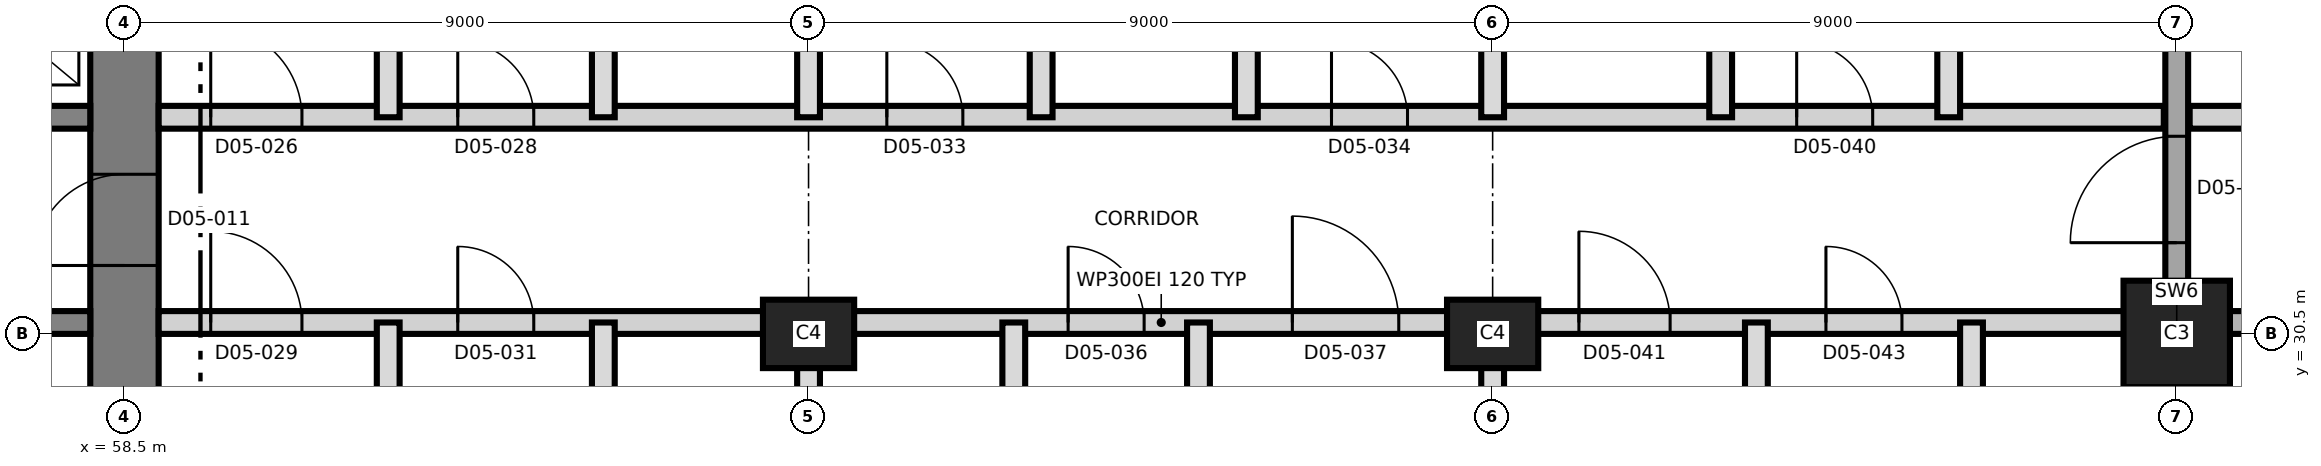
"""IFC4 building model, lengths in metres.
Left out: names, types, materials, properties, quantities, classifications, styles, units other than length and angle.
Written with IfcOpenShell. Run it as: python <this file> out.ifc"""

import sys

from ifc_helpers import new_model, si_unit, direction, frame, frame_2d, origin, origin_2d, place, context, subcontext, project, spatial, rectangle, extrude, element, fill, save


model = new_model("IFC4")
c1 = context("Model", 3, precision=1e-05, world=origin(), true_north=direction((0.0, 1.0)))
c2 = subcontext(c1, "Body", "Model", "MODEL_VIEW")
j1 = project(units=[si_unit("LENGTHUNIT", "METRE"), si_unit("PLANEANGLEUNIT", "RADIAN")], contexts=[c1])
p1 = place(None, origin())
s1 = spatial("IfcSite", under=j1, at=p1, CompositionType="ELEMENT")
p2 = place(p1, origin())
s2 = spatial("IfcBuilding", under=s1, at=p2, CompositionType="ELEMENT")
p3 = place(p2, frame((0.0, 0.0, 70.5)))
s3 = spatial("IfcBuildingStorey", under=s2, at=p3, CompositionType="ELEMENT", Elevation=70.5)
p4 = place(p3, frame((58.5, 21.05, 0.0), z_axis=(0.0, 0.0, 1.0), x_axis=(0.0, 1.0, 0.0)))
e1 = element("IfcWall", 1, at=p4, inside=s3, PredefinedType="SHEAR", context=c2, shape_type="SweptSolid", body=[
    extrude(rectangle(XDim=18.9, YDim=0.9, at=frame_2d((9.45, 0.0))), origin(), (0.0, 0.0, 1.0), 3.7),
])
p5 = place(p4, frame((10.35, 0.0, 0.0)))
e2 = element("IfcOpeningElement", 2, at=p5, cuts=e1, PredefinedType="OPENING", context=c2, shape_type="SweptSolid", body=[
    extrude(rectangle(XDim=1.2, YDim=2.1, at=frame_2d((0.6, 1.05))), frame((0.0, 0.46, 0.0), z_axis=(0.0, -1.0, 0.0), x_axis=(1.0, 0.0, 0.0)), (0.0, 0.0, 1.0), 0.92),
])
p6 = place(p3, frame((31.95, 30.65, 0.0), z_axis=(0.0, 0.0, 1.0), x_axis=(1.0, 0.0, 0.0)))
e3 = element("IfcWall", 3, at=p6, inside=s3, PredefinedType="SHEAR", context=c2, shape_type="SweptSolid", body=[
    extrude(rectangle(XDim=26.1, YDim=0.3, at=frame_2d((13.05, 0.0))), origin(), (0.0, 0.0, 1.0), 3.7),
])
p7 = place(p6, frame((24.55, 0.0, 0.0)))
e4 = element("IfcOpeningElement", 4, at=p7, cuts=e3, PredefinedType="OPENING", context=c2, shape_type="SweptSolid", body=[
    extrude(rectangle(XDim=1.0, YDim=2.1, at=frame_2d((0.5, 1.05))), frame((0.0, 0.16, 0.0), z_axis=(0.0, -1.0, 0.0), x_axis=(1.0, 0.0, 0.0)), (0.0, 0.0, 1.0), 0.32),
])
p8 = place(p6, frame((11.35, 0.0, 0.0)))
e5 = element("IfcOpeningElement", 5, at=p8, cuts=e3, PredefinedType="OPENING", context=c2, shape_type="SweptSolid", body=[
    extrude(rectangle(XDim=1.0, YDim=2.1, at=frame_2d((0.5, 1.05))), frame((0.0, 0.16, 0.0), z_axis=(0.0, -1.0, 0.0), x_axis=(1.0, 0.0, 0.0)), (0.0, 0.0, 1.0), 0.32),
])
p9 = place(p3, frame((31.95, 33.35, 0.0), z_axis=(0.0, 0.0, 1.0), x_axis=(1.0, 0.0, 0.0)))
e6 = element("IfcWall", 6, at=p9, inside=s3, PredefinedType="SHEAR", context=c2, shape_type="SweptSolid", body=[
    extrude(rectangle(XDim=26.1, YDim=0.3, at=frame_2d((13.05, 0.0))), origin(), (0.0, 0.0, 1.0), 3.7),
])
p10 = place(p9, frame((13.7, 0.0, 0.0)))
e7 = element("IfcOpeningElement", 7, at=p10, cuts=e6, PredefinedType="OPENING", context=c2, shape_type="SweptSolid", body=[
    extrude(rectangle(XDim=1.4, YDim=2.1, at=frame_2d((0.7, 1.05))), frame((0.0, 0.16, 0.0), z_axis=(0.0, -1.0, 0.0), x_axis=(1.0, 0.0, 0.0)), (0.0, 0.0, 1.0), 0.32),
])
p11 = place(p9, frame((5.175, 0.0, 0.0)))
e8 = element("IfcOpeningElement", 8, at=p11, cuts=e6, PredefinedType="OPENING", context=c2, shape_type="SweptSolid", body=[
    extrude(rectangle(XDim=1.2, YDim=2.1, at=frame_2d((0.6, 1.05))), frame((0.0, 0.16, 0.0), z_axis=(0.0, -1.0, 0.0), x_axis=(1.0, 0.0, 0.0)), (0.0, 0.0, 1.0), 0.32),
])
p12 = place(p9, frame((19.725, 0.0, 0.0)))
e9 = element("IfcOpeningElement", 9, at=p12, cuts=e6, PredefinedType="OPENING", context=c2, shape_type="SweptSolid", body=[
    extrude(rectangle(XDim=1.2, YDim=2.1, at=frame_2d((0.6, 1.05))), frame((0.0, 0.16, 0.0), z_axis=(0.0, -1.0, 0.0), x_axis=(1.0, 0.0, 0.0)), (0.0, 0.0, 1.0), 0.32),
])
for number, where, z_axis, x_axis in (
    (10, (67.5, 30.5, 0.0), (0.0, 0.0, 1.0), (1.0, 0.0, 0.0)),
    (11, (76.5, 30.5, 0.0), (0.0, 0.0, 1.0), (1.0, 0.0, 0.0)),
):
    element("IfcColumn", number, at=place(p3, frame(where, z_axis=z_axis, x_axis=x_axis)), inside=s3, PredefinedType="COLUMN", context=c2, shape_type="SweptSolid", body=[
        extrude(rectangle(XDim=1.2, YDim=0.9, at=origin_2d()), origin(), (0.0, 0.0, 1.0), 3.7),
    ])
p13 = place(p3, frame((85.5, 30.5, 0.0), z_axis=(0.0, 0.0, 1.0), x_axis=(1.0, 0.0, 0.0)))
e12 = element("IfcColumn", 12, at=p13, inside=s3, PredefinedType="COLUMN", context=c2, shape_type="SweptSolid", body=[
    extrude(rectangle(XDim=1.4, YDim=1.4, at=origin_2d()), origin(), (0.0, 0.0, 1.0), 3.7),
])
p14 = place(p3, frame((85.5, 20.35, 0.0), z_axis=(0.0, 0.0, 1.0), x_axis=(0.0, 1.0, 0.0)))
e13 = element("IfcWall", 13, at=p14, inside=s3, PredefinedType="SHEAR", context=c2, shape_type="SweptSolid", body=[
    extrude(rectangle(XDim=20.3, YDim=0.3, at=frame_2d((10.15, 0.0))), origin(), (0.0, 0.0, 1.0), 3.7),
])
p15 = place(p14, frame((11.35, 0.0, 0.0)))
e14 = element("IfcOpeningElement", 14, at=p15, cuts=e13, PredefinedType="OPENING", context=c2, shape_type="SweptSolid", body=[
    extrude(rectangle(XDim=1.4, YDim=2.1, at=frame_2d((0.7, 1.05))), frame((0.0, 0.16, 0.0), z_axis=(0.0, -1.0, 0.0), x_axis=(1.0, 0.0, 0.0)), (0.0, 0.0, 1.0), 0.32),
])
p16 = place(p3, frame((58.95, 30.65, 0.0), z_axis=(0.0, 0.0, 1.0), x_axis=(1.0, 0.0, 0.0)))
e15 = element("IfcWall", 15, at=p16, inside=s3, PredefinedType="PARTITIONING", context=c2, shape_type="SweptSolid", body=[
    extrude(rectangle(XDim=26.38, YDim=0.3, at=frame_2d((13.19, 0.0))), origin(), (0.0, 0.0, 1.0), 3.4),
])
p17 = place(p16, frame((0.685, 0.0, 0.0)))
e16 = element("IfcOpeningElement", 16, at=p17, cuts=e15, PredefinedType="OPENING", context=c2, shape_type="SweptSolid", body=[
    extrude(rectangle(XDim=1.2, YDim=2.1, at=frame_2d((0.6, 1.05))), frame((0.0, 0.16, 0.0), z_axis=(0.0, -1.0, 0.0), x_axis=(1.0, 0.0, 0.0)), (0.0, 0.0, 1.0), 0.32),
])
p18 = place(p16, frame((3.935, 0.0, 0.0)))
e17 = element("IfcOpeningElement", 17, at=p18, cuts=e15, PredefinedType="OPENING", context=c2, shape_type="SweptSolid", body=[
    extrude(rectangle(XDim=1.0, YDim=2.1, at=frame_2d((0.5, 1.05))), frame((0.0, 0.16, 0.0), z_axis=(0.0, -1.0, 0.0), x_axis=(1.0, 0.0, 0.0)), (0.0, 0.0, 1.0), 0.32),
])
p19 = place(p16, frame((11.965, 0.0, 0.0)))
e18 = element("IfcOpeningElement", 18, at=p19, cuts=e15, PredefinedType="OPENING", context=c2, shape_type="SweptSolid", body=[
    extrude(rectangle(XDim=1.0, YDim=2.1, at=frame_2d((0.5, 1.05))), frame((0.0, 0.16, 0.0), z_axis=(0.0, -1.0, 0.0), x_axis=(1.0, 0.0, 0.0)), (0.0, 0.0, 1.0), 0.32),
])
p20 = place(p16, frame((14.915, 0.0, 0.0)))
e19 = element("IfcOpeningElement", 19, at=p20, cuts=e15, PredefinedType="OPENING", context=c2, shape_type="SweptSolid", body=[
    extrude(rectangle(XDim=1.4, YDim=2.1, at=frame_2d((0.7, 1.05))), frame((0.0, 0.16, 0.0), z_axis=(0.0, -1.0, 0.0), x_axis=(1.0, 0.0, 0.0)), (0.0, 0.0, 1.0), 0.32),
])
p21 = place(p16, frame((18.685, 0.0, 0.0)))
e20 = element("IfcOpeningElement", 20, at=p21, cuts=e15, PredefinedType="OPENING", context=c2, shape_type="SweptSolid", body=[
    extrude(rectangle(XDim=1.2, YDim=2.1, at=frame_2d((0.6, 1.05))), frame((0.0, 0.16, 0.0), z_axis=(0.0, -1.0, 0.0), x_axis=(1.0, 0.0, 0.0)), (0.0, 0.0, 1.0), 0.32),
])
p22 = place(p16, frame((21.935, 0.0, 0.0)))
e21 = element("IfcOpeningElement", 21, at=p22, cuts=e15, PredefinedType="OPENING", context=c2, shape_type="SweptSolid", body=[
    extrude(rectangle(XDim=1.0, YDim=2.1, at=frame_2d((0.5, 1.05))), frame((0.0, 0.16, 0.0), z_axis=(0.0, -1.0, 0.0), x_axis=(1.0, 0.0, 0.0)), (0.0, 0.0, 1.0), 0.32),
])
p23 = place(p3, frame((85.67, 30.65, 0.0), z_axis=(0.0, 0.0, 1.0), x_axis=(1.0, 0.0, 0.0)))
e22 = element("IfcWall", 22, at=p23, inside=s3, PredefinedType="SHEAR", context=c2, shape_type="SweptSolid", body=[
    extrude(rectangle(XDim=9.58, YDim=0.3, at=frame_2d((4.79, 0.0))), origin(), (0.0, 0.0, 1.0), 3.4),
])
p24 = place(p23, frame((2.08, 0.0, 0.0)))
e23 = element("IfcOpeningElement", 23, at=p24, cuts=e22, PredefinedType="OPENING", context=c2, shape_type="SweptSolid", body=[
    extrude(rectangle(XDim=1.2, YDim=2.1, at=frame_2d((0.6, 1.05))), frame((0.0, 0.16, 0.0), z_axis=(0.0, -1.0, 0.0), x_axis=(1.0, 0.0, 0.0)), (0.0, 0.0, 1.0), 0.32),
])
p25 = place(p23, frame((5.63, 0.0, 0.0)))
e24 = element("IfcOpeningElement", 24, at=p25, cuts=e22, PredefinedType="OPENING", context=c2, shape_type="SweptSolid", body=[
    extrude(rectangle(XDim=1.0, YDim=2.1, at=frame_2d((0.5, 1.05))), frame((0.0, 0.16, 0.0), z_axis=(0.0, -1.0, 0.0), x_axis=(1.0, 0.0, 0.0)), (0.0, 0.0, 1.0), 0.32),
])
p26 = place(p3, frame((58.95, 33.35, 0.0), z_axis=(0.0, 0.0, 1.0), x_axis=(1.0, 0.0, 0.0)))
e25 = element("IfcWall", 25, at=p26, inside=s3, PredefinedType="PARTITIONING", context=c2, shape_type="SweptSolid", body=[
    extrude(rectangle(XDim=26.38, YDim=0.3, at=frame_2d((13.19, 0.0))), origin(), (0.0, 0.0, 1.0), 3.4),
])
p27 = place(p26, frame((0.685, 0.0, 0.0)))
e26 = element("IfcOpeningElement", 26, at=p27, cuts=e25, PredefinedType="OPENING", context=c2, shape_type="SweptSolid", body=[
    extrude(rectangle(XDim=1.2, YDim=2.1, at=frame_2d((0.6, 1.05))), frame((0.0, 0.16, 0.0), z_axis=(0.0, -1.0, 0.0), x_axis=(1.0, 0.0, 0.0)), (0.0, 0.0, 1.0), 0.32),
])
p28 = place(p26, frame((3.935, 0.0, 0.0)))
e27 = element("IfcOpeningElement", 27, at=p28, cuts=e25, PredefinedType="OPENING", context=c2, shape_type="SweptSolid", body=[
    extrude(rectangle(XDim=1.0, YDim=2.1, at=frame_2d((0.5, 1.05))), frame((0.0, 0.16, 0.0), z_axis=(0.0, -1.0, 0.0), x_axis=(1.0, 0.0, 0.0)), (0.0, 0.0, 1.0), 0.32),
])
p29 = place(p26, frame((9.58, 0.0, 0.0)))
e28 = element("IfcOpeningElement", 28, at=p29, cuts=e25, PredefinedType="OPENING", context=c2, shape_type="SweptSolid", body=[
    extrude(rectangle(XDim=1.0, YDim=2.1, at=frame_2d((0.5, 1.05))), frame((0.0, 0.16, 0.0), z_axis=(0.0, -1.0, 0.0), x_axis=(1.0, 0.0, 0.0)), (0.0, 0.0, 1.0), 0.32),
])
p30 = place(p26, frame((15.43, 0.0, 0.0)))
e29 = element("IfcOpeningElement", 29, at=p30, cuts=e25, PredefinedType="OPENING", context=c2, shape_type="SweptSolid", body=[
    extrude(rectangle(XDim=1.0, YDim=2.1, at=frame_2d((0.5, 1.05))), frame((0.0, 0.16, 0.0), z_axis=(0.0, -1.0, 0.0), x_axis=(1.0, 0.0, 0.0)), (0.0, 0.0, 1.0), 0.32),
])
p31 = place(p26, frame((21.55, 0.0, 0.0)))
e30 = element("IfcOpeningElement", 30, at=p31, cuts=e25, PredefinedType="OPENING", context=c2, shape_type="SweptSolid", body=[
    extrude(rectangle(XDim=1.0, YDim=2.4, at=frame_2d((0.5, 1.2))), frame((0.0, 0.16, 0.0), z_axis=(0.0, -1.0, 0.0), x_axis=(1.0, 0.0, 0.0)), (0.0, 0.0, 1.0), 0.32),
])
p32 = place(p3, frame((85.67, 33.35, 0.0), z_axis=(0.0, 0.0, 1.0), x_axis=(1.0, 0.0, 0.0)))
e31 = element("IfcWall", 31, at=p32, inside=s3, PredefinedType="PARTITIONING", context=c2, shape_type="SweptSolid", body=[
    extrude(rectangle(XDim=9.58, YDim=0.3, at=frame_2d((4.79, 0.0))), origin(), (0.0, 0.0, 1.0), 3.4),
])
p33 = place(p32, frame((1.83, 0.0, 0.0)))
e32 = element("IfcOpeningElement", 32, at=p33, cuts=e31, PredefinedType="OPENING", context=c2, shape_type="SweptSolid", body=[
    extrude(rectangle(XDim=1.0, YDim=2.1, at=frame_2d((0.5, 1.05))), frame((0.0, 0.16, 0.0), z_axis=(0.0, -1.0, 0.0), x_axis=(1.0, 0.0, 0.0)), (0.0, 0.0, 1.0), 0.32),
])
p34 = place(p32, frame((5.63, 0.0, 0.0)))
e33 = element("IfcOpeningElement", 33, at=p34, cuts=e31, PredefinedType="OPENING", context=c2, shape_type="SweptSolid", body=[
    extrude(rectangle(XDim=1.0, YDim=2.1, at=frame_2d((0.5, 1.05))), frame((0.0, 0.16, 0.0), z_axis=(0.0, -1.0, 0.0), x_axis=(1.0, 0.0, 0.0)), (0.0, 0.0, 1.0), 0.32),
])
p35 = place(p3, frame((61.97, 20.35, 0.0), z_axis=(0.0, 0.0, 1.0), x_axis=(0.0, 1.0, 0.0)))
e34 = element("IfcWall", 34, at=p35, inside=s3, PredefinedType="PARTITIONING", context=c2, shape_type="SweptSolid", body=[
    extrude(rectangle(XDim=10.3, YDim=0.3, at=frame_2d((5.15, 0.0))), origin(), (0.0, 0.0, 1.0), 3.4),
])
p36 = place(p3, frame((61.97, 33.35, 0.0), z_axis=(0.0, 0.0, 1.0), x_axis=(0.0, 1.0, 0.0)))
e35 = element("IfcWall", 35, at=p36, inside=s3, PredefinedType="PARTITIONING", context=c2, shape_type="SweptSolid", body=[
    extrude(rectangle(XDim=7.48, YDim=0.3, at=frame_2d((3.74, 0.0))), origin(), (0.0, 0.0, 1.0), 3.4),
])
for number, where, z_axis, x_axis in (
    (36, (64.8, 27.45, 0.0), (0.0, 0.0, 1.0), (0.0, 1.0, 0.0)),
    (37, (64.8, 33.35, 0.0), (0.0, 0.0, 1.0), (0.0, 1.0, 0.0)),
):
    element("IfcWall", number, at=place(p3, frame(where, z_axis=z_axis, x_axis=x_axis)), inside=s3, PredefinedType="PARTITIONING", context=c2, shape_type="SweptSolid", body=[
        extrude(rectangle(XDim=3.2, YDim=0.3, at=frame_2d((1.6, 0.0))), origin(), (0.0, 0.0, 1.0), 3.4),
    ])
p37 = place(p3, frame((67.5, 20.35, 0.0), z_axis=(0.0, 0.0, 1.0), x_axis=(0.0, 1.0, 0.0)))
e38 = element("IfcWall", 38, at=p37, inside=s3, PredefinedType="PARTITIONING", context=c2, shape_type="SweptSolid", body=[
    extrude(rectangle(XDim=10.3, YDim=0.3, at=frame_2d((5.15, 0.0))), origin(), (0.0, 0.0, 1.0), 3.4),
])
p38 = place(p3, frame((67.5, 33.35, 0.0), z_axis=(0.0, 0.0, 1.0), x_axis=(0.0, 1.0, 0.0)))
e39 = element("IfcWall", 39, at=p38, inside=s3, PredefinedType="PARTITIONING", context=c2, shape_type="SweptSolid", body=[
    extrude(rectangle(XDim=7.48, YDim=0.3, at=frame_2d((3.74, 0.0))), origin(), (0.0, 0.0, 1.0), 3.4),
])
for number, where, z_axis, x_axis in (
    (40, (70.2, 27.45, 0.0), (0.0, 0.0, 1.0), (0.0, 1.0, 0.0)),
    (41, (70.56, 33.35, 0.0), (0.0, 0.0, 1.0), (0.0, 1.0, 0.0)),
):
    element("IfcWall", number, at=place(p3, frame(where, z_axis=z_axis, x_axis=x_axis)), inside=s3, PredefinedType="PARTITIONING", context=c2, shape_type="SweptSolid", body=[
        extrude(rectangle(XDim=3.2, YDim=0.3, at=frame_2d((1.6, 0.0))), origin(), (0.0, 0.0, 1.0), 3.4),
    ])
p39 = place(p3, frame((72.63, 20.35, 0.0), z_axis=(0.0, 0.0, 1.0), x_axis=(0.0, 1.0, 0.0)))
e42 = element("IfcWall", 42, at=p39, inside=s3, PredefinedType="PARTITIONING", context=c2, shape_type="SweptSolid", body=[
    extrude(rectangle(XDim=10.3, YDim=0.3, at=frame_2d((5.15, 0.0))), origin(), (0.0, 0.0, 1.0), 3.4),
])
p40 = place(p3, frame((73.26, 33.35, 0.0), z_axis=(0.0, 0.0, 1.0), x_axis=(0.0, 1.0, 0.0)))
e43 = element("IfcWall", 43, at=p40, inside=s3, PredefinedType="PARTITIONING", context=c2, shape_type="SweptSolid", body=[
    extrude(rectangle(XDim=7.48, YDim=0.3, at=frame_2d((3.74, 0.0))), origin(), (0.0, 0.0, 1.0), 3.4),
])
p41 = place(p3, frame((76.5, 20.35, 0.0), z_axis=(0.0, 0.0, 1.0), x_axis=(0.0, 1.0, 0.0)))
e44 = element("IfcWall", 44, at=p41, inside=s3, PredefinedType="PARTITIONING", context=c2, shape_type="SweptSolid", body=[
    extrude(rectangle(XDim=10.3, YDim=0.3, at=frame_2d((5.15, 0.0))), origin(), (0.0, 0.0, 1.0), 3.4),
])
p42 = place(p3, frame((76.5, 33.35, 0.0), z_axis=(0.0, 0.0, 1.0), x_axis=(0.0, 1.0, 0.0)))
e45 = element("IfcWall", 45, at=p42, inside=s3, PredefinedType="PARTITIONING", context=c2, shape_type="SweptSolid", body=[
    extrude(rectangle(XDim=7.48, YDim=0.3, at=frame_2d((3.74, 0.0))), origin(), (0.0, 0.0, 1.0), 3.4),
])
p43 = place(p3, frame((79.5, 33.35, 0.0), z_axis=(0.0, 0.0, 1.0), x_axis=(0.0, 1.0, 0.0)))
e46 = element("IfcWall", 46, at=p43, inside=s3, PredefinedType="PARTITIONING", context=c2, shape_type="SweptSolid", body=[
    extrude(rectangle(XDim=3.3, YDim=0.3, at=frame_2d((1.65, 0.0))), origin(), (0.0, 0.0, 1.0), 3.4),
])
p44 = place(p3, frame((79.97, 20.35, 0.0), z_axis=(0.0, 0.0, 1.0), x_axis=(0.0, 1.0, 0.0)))
e47 = element("IfcWall", 47, at=p44, inside=s3, PredefinedType="PARTITIONING", context=c2, shape_type="SweptSolid", body=[
    extrude(rectangle(XDim=10.3, YDim=0.3, at=frame_2d((5.15, 0.0))), origin(), (0.0, 0.0, 1.0), 3.4),
])
p45 = place(p3, frame((82.5, 33.35, 0.0), z_axis=(0.0, 0.0, 1.0), x_axis=(0.0, 1.0, 0.0)))
e48 = element("IfcWall", 48, at=p45, inside=s3, PredefinedType="PARTITIONING", context=c2, shape_type="SweptSolid", body=[
    extrude(rectangle(XDim=3.3, YDim=0.3, at=frame_2d((1.65, 0.0))), origin(), (0.0, 0.0, 1.0), 3.4),
])
p46 = place(p3, frame((82.8, 27.45, 0.0), z_axis=(0.0, 0.0, 1.0), x_axis=(0.0, 1.0, 0.0)))
e49 = element("IfcWall", 49, at=p46, inside=s3, PredefinedType="PARTITIONING", context=c2, shape_type="SweptSolid", body=[
    extrude(rectangle(XDim=3.2, YDim=0.3, at=frame_2d((1.6, 0.0))), origin(), (0.0, 0.0, 1.0), 3.4),
])
p47 = place(p5, origin())
e50 = element("IfcDoor", 50, at=p47, inside=s3, OperationType="SINGLE_SWING_LEFT", PredefinedType="DOOR", context=c2, shape_type="SweptSolid", body=[
    extrude(rectangle(XDim=1.2, YDim=2.1, at=frame_2d((0.6, 1.05))), frame((0.0, 0.025, 0.0), z_axis=(0.0, -1.0, 0.0), x_axis=(1.0, 0.0, 0.0)), (0.0, 0.0, 1.0), 0.05),
])
fill(e2, e50)
p48 = place(p27, origin())
e51 = element("IfcDoor", 51, at=p48, inside=s3, OperationType="SINGLE_SWING_LEFT", PredefinedType="DOOR", context=c2, shape_type="SweptSolid", body=[
    extrude(rectangle(XDim=1.2, YDim=2.1, at=frame_2d((0.6, 1.05))), frame((0.0, 0.025, 0.0), z_axis=(0.0, -1.0, 0.0), x_axis=(1.0, 0.0, 0.0)), (0.0, 0.0, 1.0), 0.05),
])
fill(e26, e51)
p49 = place(p28, origin())
e52 = element("IfcDoor", 52, at=p49, inside=s3, OperationType="SINGLE_SWING_LEFT", PredefinedType="DOOR", context=c2, shape_type="SweptSolid", body=[
    extrude(rectangle(XDim=1.0, YDim=2.1, at=frame_2d((0.5, 1.05))), frame((0.0, 0.025, 0.0), z_axis=(0.0, -1.0, 0.0), x_axis=(1.0, 0.0, 0.0)), (0.0, 0.0, 1.0), 0.05),
])
fill(e27, e52)
p50 = place(p17, origin())
e53 = element("IfcDoor", 53, at=p50, inside=s3, OperationType="SINGLE_SWING_LEFT", PredefinedType="DOOR", context=c2, shape_type="SweptSolid", body=[
    extrude(rectangle(XDim=1.2, YDim=2.1, at=frame_2d((0.6, 1.05))), frame((0.0, 0.025, 0.0), z_axis=(0.0, -1.0, 0.0), x_axis=(1.0, 0.0, 0.0)), (0.0, 0.0, 1.0), 0.05),
])
fill(e16, e53)
p51 = place(p18, origin())
e54 = element("IfcDoor", 54, at=p51, inside=s3, OperationType="SINGLE_SWING_LEFT", PredefinedType="DOOR", context=c2, shape_type="SweptSolid", body=[
    extrude(rectangle(XDim=1.0, YDim=2.1, at=frame_2d((0.5, 1.05))), frame((0.0, 0.025, 0.0), z_axis=(0.0, -1.0, 0.0), x_axis=(1.0, 0.0, 0.0)), (0.0, 0.0, 1.0), 0.05),
])
fill(e17, e54)
p52 = place(p29, origin())
e55 = element("IfcDoor", 55, at=p52, inside=s3, OperationType="SINGLE_SWING_LEFT", PredefinedType="DOOR", context=c2, shape_type="SweptSolid", body=[
    extrude(rectangle(XDim=1.0, YDim=2.1, at=frame_2d((0.5, 1.05))), frame((0.0, 0.025, 0.0), z_axis=(0.0, -1.0, 0.0), x_axis=(1.0, 0.0, 0.0)), (0.0, 0.0, 1.0), 0.05),
])
fill(e28, e55)
p53 = place(p30, origin())
e56 = element("IfcDoor", 56, at=p53, inside=s3, OperationType="SINGLE_SWING_RIGHT", PredefinedType="DOOR", context=c2, shape_type="SweptSolid", body=[
    extrude(rectangle(XDim=1.0, YDim=2.1, at=frame_2d((0.5, 1.05))), frame((0.0, 0.025, 0.0), z_axis=(0.0, -1.0, 0.0), x_axis=(1.0, 0.0, 0.0)), (0.0, 0.0, 1.0), 0.05),
])
fill(e29, e56)
p54 = place(p19, origin())
e57 = element("IfcDoor", 57, at=p54, inside=s3, OperationType="SINGLE_SWING_LEFT", PredefinedType="DOOR", context=c2, shape_type="SweptSolid", body=[
    extrude(rectangle(XDim=1.0, YDim=2.1, at=frame_2d((0.5, 1.05))), frame((0.0, 0.025, 0.0), z_axis=(0.0, -1.0, 0.0), x_axis=(1.0, 0.0, 0.0)), (0.0, 0.0, 1.0), 0.05),
])
fill(e18, e57)
p55 = place(p20, origin())
e58 = element("IfcDoor", 58, at=p55, inside=s3, OperationType="SINGLE_SWING_RIGHT", PredefinedType="DOOR", context=c2, shape_type="SweptSolid", body=[
    extrude(rectangle(XDim=1.4, YDim=2.1, at=frame_2d((0.7, 1.05))), frame((0.0, 0.025, 0.0), z_axis=(0.0, -1.0, 0.0), x_axis=(1.0, 0.0, 0.0)), (0.0, 0.0, 1.0), 0.05),
])
fill(e19, e58)
p56 = place(p31, origin())
e59 = element("IfcDoor", 59, at=p56, inside=s3, OperationType="SINGLE_SWING_LEFT", PredefinedType="DOOR", context=c2, shape_type="SweptSolid", body=[
    extrude(rectangle(XDim=1.0, YDim=2.4, at=frame_2d((0.5, 1.2))), frame((0.0, 0.025, 0.0), z_axis=(0.0, -1.0, 0.0), x_axis=(1.0, 0.0, 0.0)), (0.0, 0.0, 1.0), 0.05),
])
fill(e30, e59)
p57 = place(p21, origin())
e60 = element("IfcDoor", 60, at=p57, inside=s3, OperationType="SINGLE_SWING_LEFT", PredefinedType="DOOR", context=c2, shape_type="SweptSolid", body=[
    extrude(rectangle(XDim=1.2, YDim=2.1, at=frame_2d((0.6, 1.05))), frame((0.0, 0.025, 0.0), z_axis=(0.0, -1.0, 0.0), x_axis=(1.0, 0.0, 0.0)), (0.0, 0.0, 1.0), 0.05),
])
fill(e20, e60)
p58 = place(p22, origin())
e61 = element("IfcDoor", 61, at=p58, inside=s3, OperationType="SINGLE_SWING_LEFT", PredefinedType="DOOR", context=c2, shape_type="SweptSolid", body=[
    extrude(rectangle(XDim=1.0, YDim=2.1, at=frame_2d((0.5, 1.05))), frame((0.0, 0.025, 0.0), z_axis=(0.0, -1.0, 0.0), x_axis=(1.0, 0.0, 0.0)), (0.0, 0.0, 1.0), 0.05),
])
fill(e21, e61)
p59 = place(p15, origin())
e62 = element("IfcDoor", 62, at=p59, inside=s3, OperationType="SINGLE_SWING_RIGHT", PredefinedType="DOOR", context=c2, shape_type="SweptSolid", body=[
    extrude(rectangle(XDim=1.4, YDim=2.1, at=frame_2d((0.7, 1.05))), frame((0.0, 0.025, 0.0), z_axis=(0.0, -1.0, 0.0), x_axis=(1.0, 0.0, 0.0)), (0.0, 0.0, 1.0), 0.05),
])
fill(e14, e62)
save(model, sys.argv[1])
